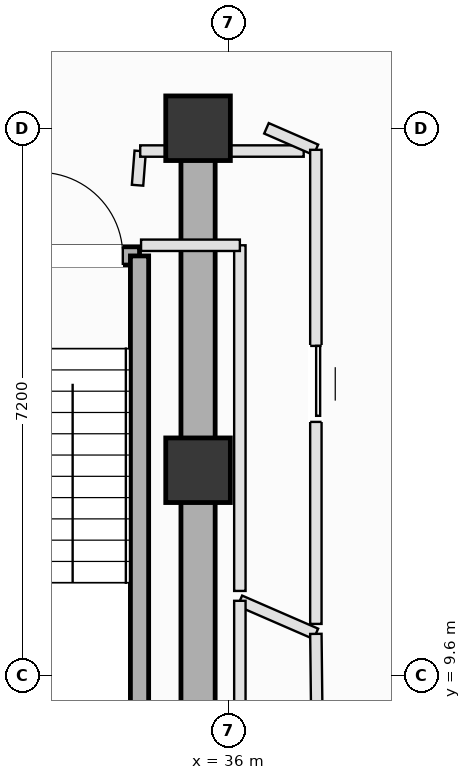
"""IFC4 building model, lengths in metres.
Left out: names, types, materials, properties, quantities, classifications, styles, units other than length and angle.
Written with IfcOpenShell. Run it as: python <this file> out.ifc"""

import sys

from ifc_helpers import new_model, si_unit, direction, frame, frame_2d, origin, origin_2d, place, context, subcontext, project, spatial, rectangle, extrude, element, fill, save


model = new_model("IFC4")
c1 = context("Model", 3, precision=1e-05, world=origin(), true_north=direction((0.0, 1.0)))
c2 = subcontext(c1, "Body", "Model", "MODEL_VIEW")
j1 = project(units=[si_unit("LENGTHUNIT", "METRE"), si_unit("PLANEANGLEUNIT", "RADIAN")], contexts=[c1])
p1 = place(None, origin())
s1 = spatial("IfcSite", under=j1, at=p1, CompositionType="ELEMENT")
p2 = place(p1, origin())
s2 = spatial("IfcBuilding", under=s1, at=p2, CompositionType="ELEMENT")
p3 = place(p2, frame((0.0, 0.0, 320.6)))
s3 = spatial("IfcBuildingStorey", under=s2, at=p3, CompositionType="ELEMENT", Elevation=320.6)
for number, where, z_axis, x_axis in (
    (1, (35.6, 12.3, 0.0), (0.0, 0.0, 1.0), (1.0, 0.0, 0.0)),
    (2, (35.6, 16.8, 0.0), (0.0, 0.0, 1.0), (1.0, 0.0, 0.0)),
):
    element("IfcColumn", number, at=place(p3, frame(where, z_axis=z_axis, x_axis=x_axis)), inside=s3, PredefinedType="COLUMN", context=c2, shape_type="SweptSolid", body=[
        extrude(rectangle(XDim=0.85, YDim=0.85, at=origin_2d()), origin(), (0.0, 0.0, 1.0), 4.0),
    ])
p4 = place(p3, frame((31.37, 15.12, 0.0), z_axis=(0.0, 0.0, 1.0), x_axis=(1.0, 0.0, 0.0)))
e3 = element("IfcWall", 3, at=p4, inside=s3, PredefinedType="SOLIDWALL", context=c2, shape_type="SweptSolid", body=[
    extrude(rectangle(XDim=3.46, YDim=0.24, at=frame_2d((1.73, 0.0))), origin(), (0.0, 0.0, 1.0), 3.78),
])
p5 = place(p4, frame((2.14, 0.0, 0.0)))
e4 = element("IfcOpeningElement", 4, at=p5, cuts=e3, PredefinedType="OPENING", context=c2, shape_type="SweptSolid", body=[
    extrude(rectangle(XDim=1.1, YDim=2.15, at=frame_2d((0.55, 1.075))), frame((0.0, 0.13, 0.0), z_axis=(0.0, -1.0, 0.0), x_axis=(1.0, 0.0, 0.0)), (0.0, 0.0, 1.0), 0.26),
])
p6 = place(p3, frame((34.83, 15.12, 0.0), z_axis=(0.0, 0.0, 1.0), x_axis=(0.0, -1.0, 0.0)))
e5 = element("IfcWall", 5, at=p6, inside=s3, PredefinedType="SOLIDWALL", context=c2, shape_type="SweptSolid", body=[
    extrude(rectangle(XDim=7.095, YDim=0.24, at=frame_2d((3.548, 0.0))), origin(), (0.0, 0.0, 1.0), 3.78),
])
p7 = place(p3, frame((35.6, 7.8, 0.0), z_axis=(0.0, 0.0, 1.0), x_axis=(0.0, 1.0, 0.0)))
e6 = element("IfcWall", 6, at=p7, inside=s3, PredefinedType="SHEAR", context=c2, shape_type="SweptSolid", body=[
    extrude(rectangle(XDim=9.0, YDim=0.45, at=frame_2d((4.5, 0.0))), origin(), (0.0, 0.0, 1.0), 3.78),
])
p8 = place(p3, frame((36.15, 10.582, 0.0), z_axis=(0.0, 0.0, 1.0), x_axis=(0.916977493273, -0.398938938724, 0.0)))
e7 = element("IfcWall", 7, at=p8, inside=s3, PredefinedType="PARTITIONING", context=c2, shape_type="SweptSolid", body=[
    extrude(rectangle(XDim=1.091, YDim=0.15, at=frame_2d((0.545, 0.0))), origin(), (0.0, 0.0, 1.0), 3.78),
])
p9 = place(p3, frame((37.15, 10.147, 0.0), z_axis=(0.0, 0.0, 1.0), x_axis=(0.011325727104, -0.999935861896, 0.0)))
e8 = element("IfcWall", 8, at=p9, inside=s3, PredefinedType="PARTITIONING", context=c2, shape_type="SweptSolid", body=[
    extrude(rectangle(XDim=0.97, YDim=0.15, at=frame_2d((0.485, 0.0))), origin(), (0.0, 0.0, 1.0), 3.78),
])
p10 = place(p3, frame((36.15, 7.5, 0.0), z_axis=(0.0, 0.0, 1.0), x_axis=(0.0, 1.0, 0.0)))
e9 = element("IfcWall", 9, at=p10, inside=s3, PredefinedType="PARTITIONING", context=c2, shape_type="SweptSolid", body=[
    extrude(rectangle(XDim=3.082, YDim=0.15, at=frame_2d((1.541, 0.0))), origin(), (0.0, 0.0, 1.0), 3.78),
])
p11 = place(p3, frame((34.804, 16.05, 0.0), z_axis=(0.0, 0.0, 1.0), x_axis=(0.077896068279, 0.996961484987, 0.0)))
e10 = element("IfcWall", 10, at=p11, inside=s3, PredefinedType="PARTITIONING", context=c2, shape_type="SweptSolid", body=[
    extrude(rectangle(XDim=0.451, YDim=0.15, at=frame_2d((0.226, 0.0))), origin(), (0.0, 0.0, 1.0), 3.78),
])
p12 = place(p3, frame((34.839, 16.5, 0.0), z_axis=(0.0, 0.0, 1.0), x_axis=(1.0, 0.0, 0.0)))
e11 = element("IfcWall", 11, at=p12, inside=s3, PredefinedType="PARTITIONING", context=c2, shape_type="SweptSolid", body=[
    extrude(rectangle(XDim=2.151, YDim=0.15, at=frame_2d((1.075, 0.0))), origin(), (0.0, 0.0, 1.0), 2.765),
])
p13 = place(p3, frame((36.5, 16.799, 0.0), z_axis=(0.0, 0.0, 1.0), x_axis=(0.916867333156, -0.399192050762, 0.0)))
e12 = element("IfcWall", 12, at=p13, inside=s3, PredefinedType="PARTITIONING", context=c2, shape_type="SweptSolid", body=[
    extrude(rectangle(XDim=0.709, YDim=0.15, at=frame_2d((0.354, 0.0))), origin(), (0.0, 0.0, 1.0), 3.78),
])
p14 = place(p3, frame((37.15, 16.516, 0.0), z_axis=(0.0, 0.0, 1.0), x_axis=(0.0, -1.0, 0.0)))
e13 = element("IfcWall", 13, at=p14, inside=s3, PredefinedType="PARTITIONING", context=c2, shape_type="SweptSolid", body=[
    extrude(rectangle(XDim=6.238, YDim=0.15, at=frame_2d((3.119, 0.0))), origin(), (0.0, 0.0, 1.0), 3.78),
])
p15 = place(p14, frame((2.58, 0.0, 0.0)))
e14 = element("IfcOpeningElement", 14, at=p15, cuts=e13, PredefinedType="OPENING", context=c2, shape_type="SweptSolid", body=[
    extrude(rectangle(XDim=1.0, YDim=2.12, at=frame_2d((0.5, 1.06))), frame((0.0, 0.085, 0.0), z_axis=(0.0, -1.0, 0.0), x_axis=(1.0, 0.0, 0.0)), (0.0, 0.0, 1.0), 0.17),
])
p16 = place(p3, frame((36.15, 10.712, 0.0), z_axis=(0.0, 0.0, 1.0), x_axis=(0.0, 1.0, 0.0)))
e15 = element("IfcWall", 15, at=p16, inside=s3, PredefinedType="PARTITIONING", context=c2, shape_type="SweptSolid", body=[
    extrude(rectangle(XDim=4.548, YDim=0.15, at=frame_2d((2.274, 0.0))), origin(), (0.0, 0.0, 1.0), 3.78),
])
p17 = place(p3, frame((36.15, 15.26, 0.0), z_axis=(0.0, 0.0, 1.0), x_axis=(-1.0, 0.0, 0.0)))
e16 = element("IfcWall", 16, at=p17, inside=s3, PredefinedType="PARTITIONING", context=c2, shape_type="SweptSolid", body=[
    extrude(rectangle(XDim=1.3, YDim=0.15, at=frame_2d((0.65, 0.0))), origin(), (0.0, 0.0, 1.0), 3.78),
])
p18 = place(p5, origin())
e17 = element("IfcDoor", 17, at=p18, inside=s3, OperationType="SINGLE_SWING_LEFT", PredefinedType="DOOR", context=c2, shape_type="SweptSolid", body=[
    extrude(rectangle(XDim=1.1, YDim=2.15, at=frame_2d((0.55, 1.075))), frame((0.0, 0.025, 0.0), z_axis=(0.0, -1.0, 0.0), x_axis=(1.0, 0.0, 0.0)), (0.0, 0.0, 1.0), 0.05),
])
fill(e4, e17)
p19 = place(p15, origin())
e18 = element("IfcDoor", 18, at=p19, inside=s3, OperationType="SLIDING_TO_LEFT", PredefinedType="DOOR", context=c2, shape_type="SweptSolid", body=[
    extrude(rectangle(XDim=1.0, YDim=2.12, at=frame_2d((0.5, 1.06))), frame((0.0, 0.025, 0.0), z_axis=(0.0, -1.0, 0.0), x_axis=(1.0, 0.0, 0.0)), (0.0, 0.0, 1.0), 0.05),
])
fill(e14, e18)
save(model, sys.argv[1])
